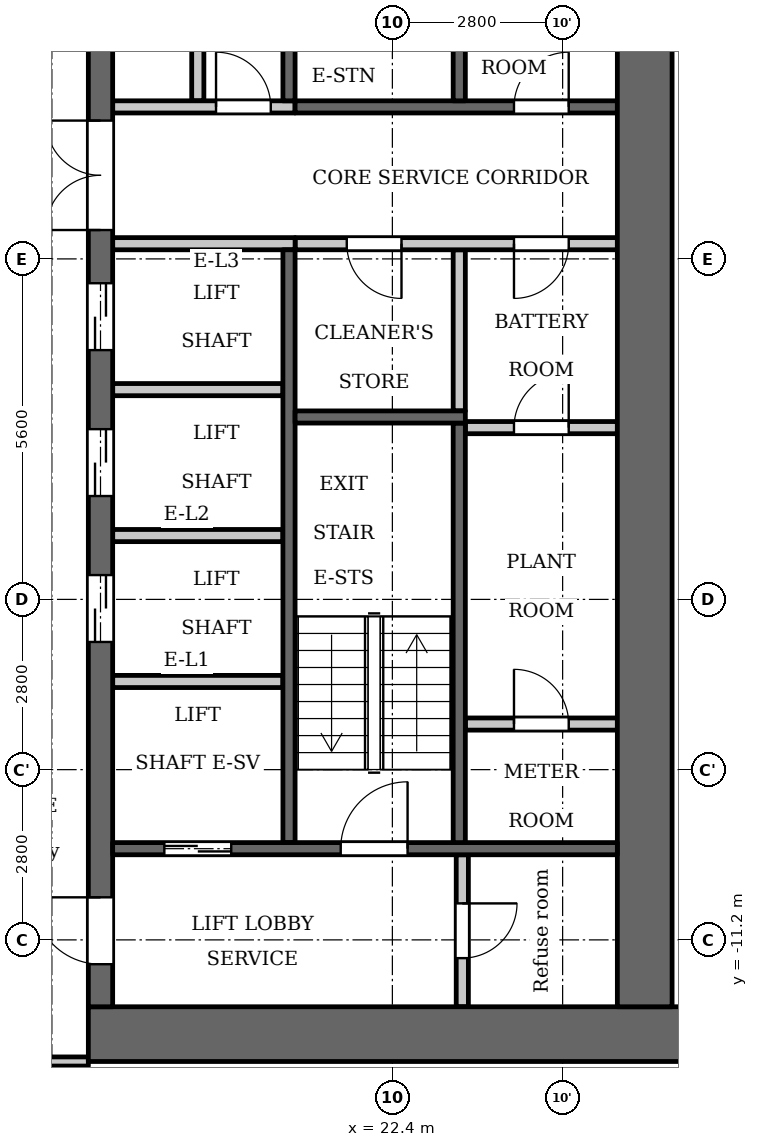
"""IFC4 building model, lengths in metres.
Left out: names, types, materials, properties, quantities, classifications, styles, units other than length and angle.
Written with IfcOpenShell. Run it as: python <this file> out.ifc"""

import sys

from ifc_helpers import new_model, si_unit, direction, frame, frame_2d, origin, place, context, subcontext, project, spatial, rectangle, extrude, element, fill, save


model = new_model("IFC4")
c1 = context("Model", 3, precision=1e-05, world=origin(), true_north=direction((0.0, 1.0)))
c2 = subcontext(c1, "Body", "Model", "MODEL_VIEW")
j1 = project(units=[si_unit("LENGTHUNIT", "METRE"), si_unit("PLANEANGLEUNIT", "RADIAN")], contexts=[c1])
p1 = place(None, origin())
s1 = spatial("IfcSite", under=j1, at=p1, CompositionType="ELEMENT")
p2 = place(p1, origin())
s2 = spatial("IfcBuilding", under=s1, at=p2, CompositionType="ELEMENT")
p3 = place(p2, frame((0.0, 0.0, 48.0)))
s3 = spatial("IfcBuildingStorey", under=s2, at=p3, CompositionType="ELEMENT", Elevation=48.0)
p4 = place(p3, frame((23.5, -2.5, 0.0), z_axis=(0.0, 0.0, 1.0), x_axis=(0.0, 1.0, 0.0)))
e1 = element("IfcWall", 1, at=p4, inside=s3, PredefinedType="PARTITIONING", context=c2, shape_type="SweptSolid", body=[
    extrude(rectangle(XDim=2.65, YDim=0.2, at=frame_2d((1.325, 0.0))), origin(), (0.0, 0.0, 1.0), 3.2),
])
p5 = place(p3, frame((20.7, 2.6, 0.0), z_axis=(0.0, 0.0, 1.0), x_axis=(0.0, 1.0, 0.0)))
e2 = element("IfcWall", 2, at=p5, inside=s3, PredefinedType="SHEAR", context=c2, shape_type="SweptSolid", body=[
    extrude(rectangle(XDim=7.0, YDim=0.2, at=frame_2d((3.5, 0.0))), origin(), (0.0, 0.0, 1.0), 3.2),
])
p6 = place(p3, frame((20.7, -9.6, 0.0), z_axis=(0.0, 0.0, 1.0), x_axis=(0.0, 1.0, 0.0)))
e3 = element("IfcWall", 3, at=p6, inside=s3, PredefinedType="SHEAR", context=c2, shape_type="SweptSolid", body=[
    extrude(rectangle(XDim=9.75, YDim=0.2, at=frame_2d((4.875, 0.0))), origin(), (0.0, 0.0, 1.0), 3.2),
])
p7 = place(p3, frame((20.8, 2.5, 0.0), z_axis=(0.0, 0.0, 1.0), x_axis=(1.0, 0.0, 0.0)))
e4 = element("IfcWall", 4, at=p7, inside=s3, PredefinedType="SHEAR", context=c2, shape_type="SweptSolid", body=[
    extrude(rectangle(XDim=5.3, YDim=0.2, at=frame_2d((2.65, 0.0))), origin(), (0.0, 0.0, 1.0), 3.2),
])
p8 = place(p7, frame((3.6, 0.0, 0.0)))
e5 = element("IfcOpeningElement", 5, at=p8, cuts=e4, PredefinedType="OPENING", context=c2, shape_type="SweptSolid", body=[
    extrude(rectangle(XDim=0.9, YDim=2.1, at=frame_2d((0.45, 1.05))), frame((0.0, 0.11, 0.0), z_axis=(0.0, -1.0, 0.0), x_axis=(1.0, 0.0, 0.0)), (0.0, 0.0, 1.0), 0.22),
])
p9 = place(p3, frame((20.8, 0.25, 0.0), z_axis=(0.0, 0.0, 1.0), x_axis=(1.0, 0.0, 0.0)))
e6 = element("IfcWall", 6, at=p9, inside=s3, PredefinedType="PARTITIONING", context=c2, shape_type="SweptSolid", body=[
    extrude(rectangle(XDim=5.3, YDim=0.2, at=frame_2d((2.65, 0.0))), origin(), (0.0, 0.0, 1.0), 3.2),
])
p10 = place(p9, frame((0.85, 0.0, 0.0)))
e7 = element("IfcOpeningElement", 7, at=p10, cuts=e6, PredefinedType="OPENING", context=c2, shape_type="SweptSolid", body=[
    extrude(rectangle(XDim=0.9, YDim=2.1, at=frame_2d((0.45, 1.05))), frame((0.0, 0.11, 0.0), z_axis=(0.0, -1.0, 0.0), x_axis=(1.0, 0.0, 0.0)), (0.0, 0.0, 1.0), 0.22),
])
p11 = place(p9, frame((3.6, 0.0, 0.0)))
e8 = element("IfcOpeningElement", 8, at=p11, cuts=e6, PredefinedType="OPENING", context=c2, shape_type="SweptSolid", body=[
    extrude(rectangle(XDim=0.9, YDim=2.1, at=frame_2d((0.45, 1.05))), frame((0.0, 0.11, 0.0), z_axis=(0.0, -1.0, 0.0), x_axis=(1.0, 0.0, 0.0)), (0.0, 0.0, 1.0), 0.22),
])
p12 = place(p3, frame((17.4, -12.75, 0.0), z_axis=(0.0, 0.0, 1.0), x_axis=(1.0, 0.0, 0.0)))
e9 = element("IfcWall", 9, at=p12, inside=s3, PredefinedType="SHEAR", context=c2, shape_type="SweptSolid", body=[
    extrude(rectangle(XDim=10.4, YDim=0.9, at=frame_2d((5.2, 0.0))), origin(), (0.0, 0.0, 1.0), 3.2),
])
p13 = place(p3, frame((19.2, 2.6, 0.0), z_axis=(0.0, 0.0, 1.0), x_axis=(0.0, 1.0, 0.0)))
e10 = element("IfcWall", 10, at=p13, inside=s3, PredefinedType="PARTITIONING", context=c2, shape_type="SweptSolid", body=[
    extrude(rectangle(XDim=4.6, YDim=0.2, at=frame_2d((2.3, 0.0))), origin(), (0.0, 0.0, 1.0), 3.2),
])
p14 = place(p3, frame((17.6, -12.3, 0.0), z_axis=(0.0, 0.0, 1.0), x_axis=(0.0, 1.0, 0.0)))
e11 = element("IfcWall", 11, at=p14, inside=s3, PredefinedType="SHEAR", context=c2, shape_type="SweptSolid", body=[
    extrude(rectangle(XDim=24.6, YDim=0.4, at=frame_2d((12.3, 0.0))), origin(), (0.0, 0.0, 1.0), 3.2),
])
p15 = place(p14, frame((6.0, 0.0, 0.0)))
e12 = element("IfcOpeningElement", 12, at=p15, cuts=e11, PredefinedType="OPENING", context=c2, shape_type="SweptSolid", body=[
    extrude(rectangle(XDim=1.1, YDim=2.1, at=frame_2d((0.55, 1.05))), frame((0.0, 0.21, 0.0), z_axis=(0.0, -1.0, 0.0), x_axis=(1.0, 0.0, 0.0)), (0.0, 0.0, 1.0), 0.42),
])
p16 = place(p14, frame((8.4, 0.0, 0.0)))
e13 = element("IfcOpeningElement", 13, at=p16, cuts=e11, PredefinedType="OPENING", context=c2, shape_type="SweptSolid", body=[
    extrude(rectangle(XDim=1.1, YDim=2.1, at=frame_2d((0.55, 1.05))), frame((0.0, 0.21, 0.0), z_axis=(0.0, -1.0, 0.0), x_axis=(1.0, 0.0, 0.0)), (0.0, 0.0, 1.0), 0.42),
])
p17 = place(p14, frame((10.8, 0.0, 0.0)))
e14 = element("IfcOpeningElement", 14, at=p17, cuts=e11, PredefinedType="OPENING", context=c2, shape_type="SweptSolid", body=[
    extrude(rectangle(XDim=1.1, YDim=2.1, at=frame_2d((0.55, 1.05))), frame((0.0, 0.21, 0.0), z_axis=(0.0, -1.0, 0.0), x_axis=(1.0, 0.0, 0.0)), (0.0, 0.0, 1.0), 0.42),
])
p18 = place(p14, frame((16.75, 0.0, 0.0)))
e15 = element("IfcOpeningElement", 15, at=p18, cuts=e11, PredefinedType="OPENING", context=c2, shape_type="SweptSolid", body=[
    extrude(rectangle(XDim=0.9, YDim=2.1, at=frame_2d((0.45, 1.05))), frame((0.0, 0.21, 0.0), z_axis=(0.0, -1.0, 0.0), x_axis=(1.0, 0.0, 0.0)), (0.0, 0.0, 1.0), 0.42),
])
p19 = place(p14, frame((22.8, 0.0, 0.0)))
e16 = element("IfcOpeningElement", 16, at=p19, cuts=e11, PredefinedType="OPENING", context=c2, shape_type="SweptSolid", body=[
    extrude(rectangle(XDim=1.1, YDim=2.1, at=frame_2d((0.55, 1.05))), frame((0.0, 0.21, 0.0), z_axis=(0.0, -1.0, 0.0), x_axis=(1.0, 0.0, 0.0)), (0.0, 0.0, 1.0), 0.42),
])
p20 = place(p14, frame((0.7, 0.0, 0.0)))
e17 = element("IfcOpeningElement", 17, at=p20, cuts=e11, PredefinedType="OPENING", context=c2, shape_type="SweptSolid", body=[
    extrude(rectangle(XDim=1.1, YDim=2.1, at=frame_2d((0.55, 1.05))), frame((0.0, 0.21, 0.0), z_axis=(0.0, -1.0, 0.0), x_axis=(1.0, 0.0, 0.0)), (0.0, 0.0, 1.0), 0.42),
])
p21 = place(p14, frame((12.775, 0.0, 0.0)))
e18 = element("IfcOpeningElement", 18, at=p21, cuts=e11, PredefinedType="OPENING", context=c2, shape_type="SweptSolid", body=[
    extrude(rectangle(XDim=1.8, YDim=2.1, at=frame_2d((0.9, 1.05))), frame((0.0, 0.21, 0.0), z_axis=(0.0, -1.0, 0.0), x_axis=(1.0, 0.0, 0.0)), (0.0, 0.0, 1.0), 0.42),
])
p22 = place(p3, frame((26.55, -12.3, 0.0), z_axis=(0.0, 0.0, 1.0), x_axis=(0.0, 1.0, 0.0)))
e19 = element("IfcWall", 19, at=p22, inside=s3, PredefinedType="SHEAR", context=c2, shape_type="SweptSolid", body=[
    extrude(rectangle(XDim=24.6, YDim=0.9, at=frame_2d((12.3, 0.0))), origin(), (0.0, 0.0, 1.0), 3.2),
])
p23 = place(p3, frame((23.55, -12.3, 0.0), z_axis=(0.0, 0.0, 1.0), x_axis=(0.0, 1.0, 0.0)))
e20 = element("IfcWall", 20, at=p23, inside=s3, PredefinedType="PARTITIONING", context=c2, shape_type="SweptSolid", body=[
    extrude(rectangle(XDim=2.5, YDim=0.2, at=frame_2d((1.25, 0.0))), origin(), (0.0, 0.0, 1.0), 3.2),
])
p24 = place(p23, frame((0.8, 0.0, 0.0)))
e21 = element("IfcOpeningElement", 21, at=p24, cuts=e20, PredefinedType="OPENING", context=c2, shape_type="SweptSolid", body=[
    extrude(rectangle(XDim=0.9, YDim=2.1, at=frame_2d((0.45, 1.05))), frame((0.0, 0.11, 0.0), z_axis=(0.0, -1.0, 0.0), x_axis=(1.0, 0.0, 0.0)), (0.0, 0.0, 1.0), 0.22),
])
p25 = place(p3, frame((23.6, -7.65, 0.0), z_axis=(0.0, 0.0, 1.0), x_axis=(1.0, 0.0, 0.0)))
e22 = element("IfcWall", 22, at=p25, inside=s3, PredefinedType="PARTITIONING", context=c2, shape_type="SweptSolid", body=[
    extrude(rectangle(XDim=2.5, YDim=0.2, at=frame_2d((1.25, 0.0))), origin(), (0.0, 0.0, 1.0), 3.2),
])
p26 = place(p25, frame((0.8, 0.0, 0.0)))
e23 = element("IfcOpeningElement", 23, at=p26, cuts=e22, PredefinedType="OPENING", context=c2, shape_type="SweptSolid", body=[
    extrude(rectangle(XDim=0.9, YDim=2.1, at=frame_2d((0.45, 1.05))), frame((0.0, 0.11, 0.0), z_axis=(0.0, -1.0, 0.0), x_axis=(1.0, 0.0, 0.0)), (0.0, 0.0, 1.0), 0.22),
])
p27 = place(p3, frame((23.6, -2.775, 0.0), z_axis=(0.0, 0.0, 1.0), x_axis=(1.0, 0.0, 0.0)))
e24 = element("IfcWall", 24, at=p27, inside=s3, PredefinedType="PARTITIONING", context=c2, shape_type="SweptSolid", body=[
    extrude(rectangle(XDim=2.5, YDim=0.2, at=frame_2d((1.25, 0.0))), origin(), (0.0, 0.0, 1.0), 3.2),
])
p28 = place(p27, frame((0.8, 0.0, 0.0)))
e25 = element("IfcOpeningElement", 25, at=p28, cuts=e24, PredefinedType="OPENING", context=c2, shape_type="SweptSolid", body=[
    extrude(rectangle(XDim=0.9, YDim=2.1, at=frame_2d((0.45, 1.05))), frame((0.0, 0.11, 0.0), z_axis=(0.0, -1.0, 0.0), x_axis=(1.0, 0.0, 0.0)), (0.0, 0.0, 1.0), 0.22),
])
p29 = place(p3, frame((17.8, -9.7, 0.0), z_axis=(0.0, 0.0, 1.0), x_axis=(1.0, 0.0, 0.0)))
e26 = element("IfcWall", 26, at=p29, inside=s3, PredefinedType="SHEAR", context=c2, shape_type="SweptSolid", body=[
    extrude(rectangle(XDim=8.3, YDim=0.2, at=frame_2d((4.15, 0.0))), origin(), (0.0, 0.0, 1.0), 3.2),
])
p30 = place(p29, frame((0.85, 0.0, 0.0)))
e27 = element("IfcOpeningElement", 27, at=p30, cuts=e26, PredefinedType="OPENING", context=c2, shape_type="SweptSolid", body=[
    extrude(rectangle(XDim=1.1, YDim=2.1, at=frame_2d((0.55, 1.05))), frame((0.0, 0.11, 0.0), z_axis=(0.0, -1.0, 0.0), x_axis=(1.0, 0.0, 0.0)), (0.0, 0.0, 1.0), 0.22),
])
p31 = place(p29, frame((3.75, 0.0, 0.0)))
e28 = element("IfcOpeningElement", 28, at=p31, cuts=e26, PredefinedType="OPENING", context=c2, shape_type="SweptSolid", body=[
    extrude(rectangle(XDim=1.1, YDim=2.1, at=frame_2d((0.55, 1.05))), frame((0.0, 0.11, 0.0), z_axis=(0.0, -1.0, 0.0), x_axis=(1.0, 0.0, 0.0)), (0.0, 0.0, 1.0), 0.22),
])
for number, where, z_axis, x_axis in (
    (29, (17.8, -6.95, 0.0), (0.0, 0.0, 1.0), (1.0, 0.0, 0.0)),
    (30, (17.8, -4.55, 0.0), (0.0, 0.0, 1.0), (1.0, 0.0, 0.0)),
    (31, (17.8, -2.15, 0.0), (0.0, 0.0, 1.0), (1.0, 0.0, 0.0)),
):
    element("IfcWall", number, at=place(p3, frame(where, z_axis=z_axis, x_axis=x_axis)), inside=s3, PredefinedType="PARTITIONING", context=c2, shape_type="SweptSolid", body=[
        extrude(rectangle(XDim=2.8, YDim=0.2, at=frame_2d((1.4, 0.0))), origin(), (0.0, 0.0, 1.0), 3.2),
    ])
p32 = place(p3, frame((17.8, 0.25, 0.0), z_axis=(0.0, 0.0, 1.0), x_axis=(1.0, 0.0, 0.0)))
e32 = element("IfcWall", 32, at=p32, inside=s3, PredefinedType="PARTITIONING", context=c2, shape_type="SweptSolid", body=[
    extrude(rectangle(XDim=3.0, YDim=0.2, at=frame_2d((1.5, 0.0))), origin(), (0.0, 0.0, 1.0), 3.2),
])
p33 = place(p3, frame((17.8, 2.5, 0.0), z_axis=(0.0, 0.0, 1.0), x_axis=(1.0, 0.0, 0.0)))
e33 = element("IfcWall", 33, at=p33, inside=s3, PredefinedType="PARTITIONING", context=c2, shape_type="SweptSolid", body=[
    extrude(rectangle(XDim=3.0, YDim=0.2, at=frame_2d((1.5, 0.0))), origin(), (0.0, 0.0, 1.0), 3.2),
])
p34 = place(p33, frame((1.7, 0.0, 0.0)))
e34 = element("IfcOpeningElement", 34, at=p34, cuts=e33, PredefinedType="OPENING", context=c2, shape_type="SweptSolid", body=[
    extrude(rectangle(XDim=0.9, YDim=2.1, at=frame_2d((0.45, 1.05))), frame((0.0, 0.11, 0.0), z_axis=(0.0, -1.0, 0.0), x_axis=(1.0, 0.0, 0.0)), (0.0, 0.0, 1.0), 0.22),
])
p35 = place(p3, frame((23.5, 2.6, 0.0), z_axis=(0.0, 0.0, 1.0), x_axis=(0.0, 1.0, 0.0)))
e35 = element("IfcWall", 35, at=p35, inside=s3, PredefinedType="SHEAR", context=c2, shape_type="SweptSolid", body=[
    extrude(rectangle(XDim=7.0, YDim=0.2, at=frame_2d((3.5, 0.0))), origin(), (0.0, 0.0, 1.0), 3.2),
])
p36 = place(p3, frame((23.5, -9.6, 0.0), z_axis=(0.0, 0.0, 1.0), x_axis=(0.0, 1.0, 0.0)))
e36 = element("IfcWall", 36, at=p36, inside=s3, PredefinedType="SHEAR", context=c2, shape_type="SweptSolid", body=[
    extrude(rectangle(XDim=6.9, YDim=0.2, at=frame_2d((3.45, 0.0))), origin(), (0.0, 0.0, 1.0), 3.2),
])
p37 = place(p3, frame((20.8, -2.6, 0.0), z_axis=(0.0, 0.0, 1.0), x_axis=(1.0, 0.0, 0.0)))
e37 = element("IfcWall", 37, at=p37, inside=s3, PredefinedType="SHEAR", context=c2, shape_type="SweptSolid", body=[
    extrude(rectangle(XDim=2.8, YDim=0.2, at=frame_2d((1.4, 0.0))), origin(), (0.0, 0.0, 1.0), 3.2),
])
p38 = place(p3, frame((-17.4, -13.2, 0.0), z_axis=(0.0, 0.0, 1.0), x_axis=(1.0, 0.0, 0.0)))
e38 = element("IfcWall", 38, at=p38, inside=s3, PredefinedType="PARTITIONING", context=c2, shape_type="SweptSolid", body=[
    extrude(rectangle(XDim=34.8, YDim=0.15, at=frame_2d((17.4, 0.0))), origin(), (0.0, 0.0, 1.0), 3.2),
])
p39 = place(p38, frame((0.65, 0.0, 0.0)))
e39 = element("IfcOpeningElement", 39, at=p39, cuts=e38, PredefinedType="OPENING", context=c2, shape_type="SweptSolid", body=[
    extrude(rectangle(XDim=1.0, YDim=2.1, at=frame_2d((0.5, 1.05))), frame((0.0, 0.085, 0.0), z_axis=(0.0, -1.0, 0.0), x_axis=(1.0, 0.0, 0.0)), (0.0, 0.0, 1.0), 0.17),
])
p40 = place(p38, frame((33.05, 0.0, 0.0)))
e40 = element("IfcOpeningElement", 40, at=p40, cuts=e38, PredefinedType="OPENING", context=c2, shape_type="SweptSolid", body=[
    extrude(rectangle(XDim=1.0, YDim=2.1, at=frame_2d((0.5, 1.05))), frame((0.0, 0.085, 0.0), z_axis=(0.0, -1.0, 0.0), x_axis=(1.0, 0.0, 0.0)), (0.0, 0.0, 1.0), 0.17),
])
p41 = place(p38, frame((4.55, 0.0, 0.0)))
e41 = element("IfcOpeningElement", 41, at=p41, cuts=e38, PredefinedType="OPENING", context=c2, shape_type="SweptSolid", body=[
    extrude(rectangle(XDim=1.0, YDim=2.1, at=frame_2d((0.5, 1.05))), frame((0.0, 0.085, 0.0), z_axis=(0.0, -1.0, 0.0), x_axis=(1.0, 0.0, 0.0)), (0.0, 0.0, 1.0), 0.17),
])
p42 = place(p38, frame((6.9, 0.0, 0.0)))
e42 = element("IfcOpeningElement", 42, at=p42, cuts=e38, PredefinedType="OPENING", context=c2, shape_type="SweptSolid", body=[
    extrude(rectangle(XDim=1.0, YDim=2.1, at=frame_2d((0.5, 1.05))), frame((0.0, 0.085, 0.0), z_axis=(0.0, -1.0, 0.0), x_axis=(1.0, 0.0, 0.0)), (0.0, 0.0, 1.0), 0.17),
])
p43 = place(p38, frame((15.75, 0.0, 0.0)))
e43 = element("IfcOpeningElement", 43, at=p43, cuts=e38, PredefinedType="OPENING", context=c2, shape_type="SweptSolid", body=[
    extrude(rectangle(XDim=1.0, YDim=2.1, at=frame_2d((0.5, 1.05))), frame((0.0, 0.085, 0.0), z_axis=(0.0, -1.0, 0.0), x_axis=(1.0, 0.0, 0.0)), (0.0, 0.0, 1.0), 0.17),
])
p44 = place(p38, frame((18.1, 0.0, 0.0)))
e44 = element("IfcOpeningElement", 44, at=p44, cuts=e38, PredefinedType="OPENING", context=c2, shape_type="SweptSolid", body=[
    extrude(rectangle(XDim=1.0, YDim=2.1, at=frame_2d((0.5, 1.05))), frame((0.0, 0.085, 0.0), z_axis=(0.0, -1.0, 0.0), x_axis=(1.0, 0.0, 0.0)), (0.0, 0.0, 1.0), 0.17),
])
p45 = place(p38, frame((26.95, 0.0, 0.0)))
e45 = element("IfcOpeningElement", 45, at=p45, cuts=e38, PredefinedType="OPENING", context=c2, shape_type="SweptSolid", body=[
    extrude(rectangle(XDim=1.0, YDim=2.1, at=frame_2d((0.5, 1.05))), frame((0.0, 0.085, 0.0), z_axis=(0.0, -1.0, 0.0), x_axis=(1.0, 0.0, 0.0)), (0.0, 0.0, 1.0), 0.17),
])
p46 = place(p38, frame((29.25, 0.0, 0.0)))
e46 = element("IfcOpeningElement", 46, at=p46, cuts=e38, PredefinedType="OPENING", context=c2, shape_type="SweptSolid", body=[
    extrude(rectangle(XDim=1.0, YDim=2.1, at=frame_2d((0.5, 1.05))), frame((0.0, 0.085, 0.0), z_axis=(0.0, -1.0, 0.0), x_axis=(1.0, 0.0, 0.0)), (0.0, 0.0, 1.0), 0.17),
])
p47 = place(p30, origin())
e47 = element("IfcDoor", 47, at=p47, inside=s3, OperationType="DOUBLE_DOOR_SLIDING", PredefinedType="DOOR", context=c2, shape_type="SweptSolid", body=[
    extrude(rectangle(XDim=1.1, YDim=2.1, at=frame_2d((0.55, 1.05))), frame((0.0, 0.025, 0.0), z_axis=(0.0, -1.0, 0.0), x_axis=(1.0, 0.0, 0.0)), (0.0, 0.0, 1.0), 0.05),
])
fill(e27, e47)
p48 = place(p15, origin())
e48 = element("IfcDoor", 48, at=p48, inside=s3, OperationType="DOUBLE_DOOR_SLIDING", PredefinedType="DOOR", context=c2, shape_type="SweptSolid", body=[
    extrude(rectangle(XDim=1.1, YDim=2.1, at=frame_2d((0.55, 1.05))), frame((0.0, 0.025, 0.0), z_axis=(0.0, -1.0, 0.0), x_axis=(1.0, 0.0, 0.0)), (0.0, 0.0, 1.0), 0.05),
])
fill(e12, e48)
p49 = place(p16, origin())
e49 = element("IfcDoor", 49, at=p49, inside=s3, OperationType="DOUBLE_DOOR_SLIDING", PredefinedType="DOOR", context=c2, shape_type="SweptSolid", body=[
    extrude(rectangle(XDim=1.1, YDim=2.1, at=frame_2d((0.55, 1.05))), frame((0.0, 0.025, 0.0), z_axis=(0.0, -1.0, 0.0), x_axis=(1.0, 0.0, 0.0)), (0.0, 0.0, 1.0), 0.05),
])
fill(e13, e49)
p50 = place(p17, origin())
e50 = element("IfcDoor", 50, at=p50, inside=s3, OperationType="DOUBLE_DOOR_SLIDING", PredefinedType="DOOR", context=c2, shape_type="SweptSolid", body=[
    extrude(rectangle(XDim=1.1, YDim=2.1, at=frame_2d((0.55, 1.05))), frame((0.0, 0.025, 0.0), z_axis=(0.0, -1.0, 0.0), x_axis=(1.0, 0.0, 0.0)), (0.0, 0.0, 1.0), 0.05),
])
fill(e14, e50)
p51 = place(p34, origin())
e51 = element("IfcDoor", 51, at=p51, inside=s3, OperationType="SINGLE_SWING_RIGHT", PredefinedType="DOOR", context=c2, shape_type="SweptSolid", body=[
    extrude(rectangle(XDim=0.9, YDim=2.1, at=frame_2d((0.45, 1.05))), frame((0.0, 0.025, 0.0), z_axis=(0.0, -1.0, 0.0), x_axis=(1.0, 0.0, 0.0)), (0.0, 0.0, 1.0), 0.05),
])
fill(e34, e51)
p52 = place(p20, origin())
e52 = element("IfcDoor", 52, at=p52, inside=s3, OperationType="SINGLE_SWING_LEFT", PredefinedType="DOOR", context=c2, shape_type="SweptSolid", body=[
    extrude(rectangle(XDim=1.1, YDim=2.1, at=frame_2d((0.55, 1.05))), frame((0.0, 0.025, 0.0), z_axis=(0.0, -1.0, 0.0), x_axis=(1.0, 0.0, 0.0)), (0.0, 0.0, 1.0), 0.05),
])
fill(e17, e52)
p53 = place(p24, origin())
e53 = element("IfcDoor", 53, at=p53, inside=s3, OperationType="SINGLE_SWING_RIGHT", PredefinedType="DOOR", context=c2, shape_type="SweptSolid", body=[
    extrude(rectangle(XDim=0.9, YDim=2.1, at=frame_2d((0.45, 1.05))), frame((0.0, 0.025, 0.0), z_axis=(0.0, -1.0, 0.0), x_axis=(1.0, 0.0, 0.0)), (0.0, 0.0, 1.0), 0.05),
])
fill(e21, e53)
p54 = place(p31, origin())
e54 = element("IfcDoor", 54, at=p54, inside=s3, OperationType="SINGLE_SWING_LEFT", PredefinedType="DOOR", context=c2, shape_type="SweptSolid", body=[
    extrude(rectangle(XDim=1.1, YDim=2.1, at=frame_2d((0.55, 1.05))), frame((0.0, 0.025, 0.0), z_axis=(0.0, -1.0, 0.0), x_axis=(1.0, 0.0, 0.0)), (0.0, 0.0, 1.0), 0.05),
])
fill(e28, e54)
p55 = place(p21, origin())
e55 = element("IfcDoor", 55, at=p55, inside=s3, OperationType="DOUBLE_DOOR_SINGLE_SWING", PredefinedType="DOOR", context=c2, shape_type="SweptSolid", body=[
    extrude(rectangle(XDim=1.8, YDim=2.1, at=frame_2d((0.9, 1.05))), frame((0.0, 0.025, 0.0), z_axis=(0.0, -1.0, 0.0), x_axis=(1.0, 0.0, 0.0)), (0.0, 0.0, 1.0), 0.05),
])
fill(e18, e55)
p56 = place(p10, origin())
e56 = element("IfcDoor", 56, at=p56, inside=s3, OperationType="SINGLE_SWING_RIGHT", PredefinedType="DOOR", context=c2, shape_type="SweptSolid", body=[
    extrude(rectangle(XDim=0.9, YDim=2.1, at=frame_2d((0.45, 1.05))), frame((0.0, 0.025, 0.0), z_axis=(0.0, -1.0, 0.0), x_axis=(1.0, 0.0, 0.0)), (0.0, 0.0, 1.0), 0.05),
])
fill(e7, e56)
p57 = place(p26, origin())
e57 = element("IfcDoor", 57, at=p57, inside=s3, OperationType="SINGLE_SWING_RIGHT", PredefinedType="DOOR", context=c2, shape_type="SweptSolid", body=[
    extrude(rectangle(XDim=0.9, YDim=2.1, at=frame_2d((0.45, 1.05))), frame((0.0, 0.025, 0.0), z_axis=(0.0, -1.0, 0.0), x_axis=(1.0, 0.0, 0.0)), (0.0, 0.0, 1.0), 0.05),
])
fill(e23, e57)
p58 = place(p28, origin())
e58 = element("IfcDoor", 58, at=p58, inside=s3, OperationType="SINGLE_SWING_LEFT", PredefinedType="DOOR", context=c2, shape_type="SweptSolid", body=[
    extrude(rectangle(XDim=0.9, YDim=2.1, at=frame_2d((0.45, 1.05))), frame((0.0, 0.025, 0.0), z_axis=(0.0, -1.0, 0.0), x_axis=(1.0, 0.0, 0.0)), (0.0, 0.0, 1.0), 0.05),
])
fill(e25, e58)
p59 = place(p11, origin())
e59 = element("IfcDoor", 59, at=p59, inside=s3, OperationType="SINGLE_SWING_LEFT", PredefinedType="DOOR", context=c2, shape_type="SweptSolid", body=[
    extrude(rectangle(XDim=0.9, YDim=2.1, at=frame_2d((0.45, 1.05))), frame((0.0, 0.025, 0.0), z_axis=(0.0, -1.0, 0.0), x_axis=(1.0, 0.0, 0.0)), (0.0, 0.0, 1.0), 0.05),
])
fill(e8, e59)
p60 = place(p8, origin())
e60 = element("IfcDoor", 60, at=p60, inside=s3, OperationType="SINGLE_SWING_LEFT", PredefinedType="DOOR", context=c2, shape_type="SweptSolid", body=[
    extrude(rectangle(XDim=0.9, YDim=2.1, at=frame_2d((0.45, 1.05))), frame((0.0, 0.025, 0.0), z_axis=(0.0, -1.0, 0.0), x_axis=(1.0, 0.0, 0.0)), (0.0, 0.0, 1.0), 0.05),
])
fill(e5, e60)
save(model, sys.argv[1])
